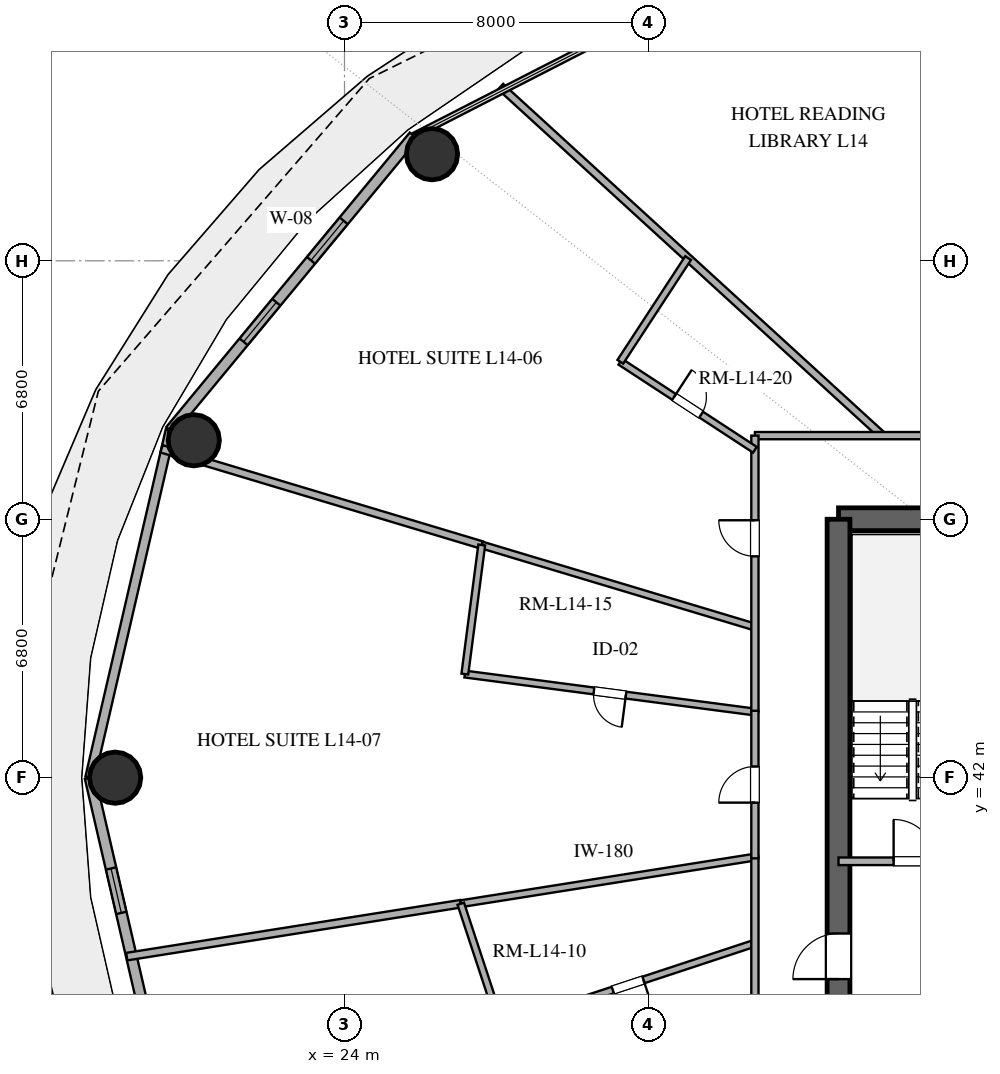
"""IFC4 building model, lengths in metres.
Left out: names, types, materials, properties, quantities, classifications, styles, units other than length and angle.
Written with IfcOpenShell. Run it as: python <this file> out.ifc"""

import sys

from ifc_helpers import new_model, si_unit, direction, frame, frame_2d, origin, origin_2d, place, context, subcontext, project, spatial, rectangle, hollow_circle, extrude, element, fill, save


model = new_model("IFC4")
c1 = context("Model", 3, precision=1e-05, world=origin(), true_north=direction((0.0, 1.0)))
c2 = subcontext(c1, "Body", "Model", "MODEL_VIEW")
j1 = project(units=[si_unit("LENGTHUNIT", "METRE"), si_unit("PLANEANGLEUNIT", "RADIAN")], contexts=[c1])
p1 = place(None, origin())
s1 = spatial("IfcSite", under=j1, at=p1, CompositionType="ELEMENT")
p2 = place(p1, origin())
s2 = spatial("IfcBuilding", under=s1, at=p2, CompositionType="ELEMENT")
p3 = place(p2, frame((0.0, 0.0, 60.6)))
s3 = spatial("IfcBuildingStorey", under=s2, at=p3, CompositionType="ELEMENT", Elevation=60.6)
p4 = place(p3, frame((37.0, 48.8, 0.0), z_axis=(0.0, 0.0, 1.0), x_axis=(1.0, 0.0, 0.0)))
e1 = element("IfcWall", 1, at=p4, inside=s3, PredefinedType="SHEAR", context=c2, shape_type="SweptSolid", body=[
    extrude(rectangle(XDim=4.0, YDim=0.6, at=frame_2d((2.0, 0.0))), origin(), (0.0, 0.0, 1.0), 3.38),
])
p5 = place(p3, frame((37.0, 35.2, 0.0), z_axis=(0.0, 0.0, 1.0), x_axis=(0.0, 1.0, 0.0)))
e2 = element("IfcWall", 2, at=p5, inside=s3, PredefinedType="SHEAR", context=c2, shape_type="SweptSolid", body=[
    extrude(rectangle(XDim=13.6, YDim=0.6, at=frame_2d((6.8, 0.0))), origin(), (0.0, 0.0, 1.0), 3.38),
])
p6 = place(p5, frame((1.5, 0.0, 0.0)))
e3 = element("IfcOpeningElement", 3, at=p6, cuts=e2, PredefinedType="OPENING", context=c2, shape_type="SweptSolid", body=[
    extrude(rectangle(XDim=1.2, YDim=2.15, at=frame_2d((0.6, 1.075))), frame((0.0, 0.31, 0.0), z_axis=(0.0, -1.0, 0.0), x_axis=(1.0, 0.0, 0.0)), (0.0, 0.0, 1.0), 0.62),
])
for number, where, z_axis, x_axis in (
    (4, (26.303, 58.405, 0.0), (0.0, 0.0, 1.0), (1.0, 0.0, 0.0)),
    (5, (20.034, 50.878, 0.0), (0.0, 0.0, 1.0), (1.0, 0.0, 0.0)),
    (6, (17.965, 42.0, 0.0), (0.0, 0.0, 1.0), (1.0, 0.0, 0.0)),
):
    element("IfcColumn", number, at=place(p3, frame(where, z_axis=z_axis, x_axis=x_axis)), inside=s3, PredefinedType="COLUMN", context=c2, shape_type="SweptSolid", body=[
        extrude(hollow_circle(Radius=0.675, WallThickness=0.036, at=origin_2d()), origin(), (0.0, 0.0, 1.0), 3.38),
    ])
p7 = place(p3, frame((25.826, 58.886, 0.0), z_axis=(0.0, 0.0, 1.0), x_axis=(-0.637296809613, -0.770618437657, 0.0)))
e7 = element("IfcWall", 7, at=p7, inside=s3, PredefinedType="SOLIDWALL", context=c2, shape_type="SweptSolid", body=[
    extrude(rectangle(XDim=10.053, YDim=0.28, at=frame_2d((5.027, 0.0))), origin(), (0.0, 0.0, 1.0), 3.38),
])
p8 = place(p7, frame((2.898, 0.0, 0.85)))
e8 = element("IfcOpeningElement", 8, at=p8, cuts=e7, PredefinedType="OPENING", context=c2, shape_type="SweptSolid", body=[
    extrude(rectangle(XDim=1.35, YDim=1.8, at=frame_2d((0.675, 0.9))), frame((0.0, 0.15, 0.0), z_axis=(0.0, -1.0, 0.0), x_axis=(1.0, 0.0, 0.0)), (0.0, 0.0, 1.0), 0.3),
])
p9 = place(p7, frame((5.68, 0.0, 0.85)))
e9 = element("IfcOpeningElement", 9, at=p9, cuts=e7, PredefinedType="OPENING", context=c2, shape_type="SweptSolid", body=[
    extrude(rectangle(XDim=1.35, YDim=1.8, at=frame_2d((0.675, 0.9))), frame((0.0, 0.15, 0.0), z_axis=(0.0, -1.0, 0.0), x_axis=(1.0, 0.0, 0.0)), (0.0, 0.0, 1.0), 0.3),
])
p10 = place(p3, frame((19.419, 51.138, 0.0), z_axis=(0.0, 0.0, 1.0), x_axis=(-0.225454452941, -0.974253709076, 0.0)))
e10 = element("IfcWall", 10, at=p10, inside=s3, PredefinedType="SOLIDWALL", context=c2, shape_type="SweptSolid", body=[
    extrude(rectangle(XDim=9.38, YDim=0.25, at=frame_2d((4.69, 0.0))), origin(), (0.0, 0.0, 1.0), 3.38),
])
p11 = place(p3, frame((17.304, 42.0, 0.0), z_axis=(0.0, 0.0, 1.0), x_axis=(0.225454452941, -0.974253709076, 0.0)))
e11 = element("IfcWall", 11, at=p11, inside=s3, PredefinedType="SOLIDWALL", context=c2, shape_type="SweptSolid", body=[
    extrude(rectangle(XDim=9.38, YDim=0.28, at=frame_2d((4.69, 0.0))), origin(), (0.0, 0.0, 1.0), 3.38),
])
p12 = place(p11, frame((2.452, 0.0, 0.85)))
e12 = element("IfcOpeningElement", 12, at=p12, cuts=e11, PredefinedType="OPENING", context=c2, shape_type="SweptSolid", body=[
    extrude(rectangle(XDim=1.2, YDim=1.6, at=frame_2d((0.6, 0.8))), frame((0.0, 0.15, 0.0), z_axis=(0.0, -1.0, 0.0), x_axis=(1.0, 0.0, 0.0)), (0.0, 0.0, 1.0), 0.3),
])
p13 = place(p11, frame((6.235, 0.0, 0.0)))
e13 = element("IfcOpeningElement", 13, at=p13, cuts=e11, PredefinedType="OPENING", context=c2, shape_type="SweptSolid", body=[
    extrude(rectangle(XDim=1.6, YDim=2.25, at=frame_2d((0.8, 1.125))), frame((0.0, 0.15, 0.0), z_axis=(0.0, -1.0, 0.0), x_axis=(1.0, 0.0, 0.0)), (0.0, 0.0, 1.0), 0.3),
])
p14 = place(p3, frame((37.0, 39.8, 0.0), z_axis=(0.0, 0.0, 1.0), x_axis=(1.0, 0.0, 0.0)))
e14 = element("IfcWall", 14, at=p14, inside=s3, PredefinedType="SOLIDWALL", context=c2, shape_type="SweptSolid", body=[
    extrude(rectangle(XDim=4.0, YDim=0.2, at=frame_2d((2.0, 0.0))), origin(), (0.0, 0.0, 1.0), 2.74),
])
p15 = place(p14, frame((1.45, 0.0, 0.0)))
e15 = element("IfcOpeningElement", 15, at=p15, cuts=e14, PredefinedType="OPENING", context=c2, shape_type="SweptSolid", body=[
    extrude(rectangle(XDim=1.1, YDim=2.15, at=frame_2d((0.55, 1.075))), frame((0.0, 0.11, 0.0), z_axis=(0.0, -1.0, 0.0), x_axis=(1.0, 0.0, 0.0)), (0.0, 0.0, 1.0), 0.22),
])
p16 = place(p3, frame((44.39, 51.0, 0.0), z_axis=(0.0, 0.0, 1.0), x_axis=(-0.372301847193, 0.928111703717, 0.0)))
e16 = element("IfcWall", 16, at=p16, inside=s3, PredefinedType="PARTITIONING", context=c2, shape_type="SweptSolid", body=[
    extrude(rectangle(XDim=14.688, YDim=0.2, at=frame_2d((7.344, 0.0))), origin(), (0.0, 0.0, 1.0), 2.74),
])
p17 = place(p3, frame((18.271, 37.292, 0.0), z_axis=(0.0, 0.0, 1.0), x_axis=(0.987691229297, 0.156416225401, 0.0)))
e17 = element("IfcWall", 17, at=p17, inside=s3, PredefinedType="PARTITIONING", context=c2, shape_type="SweptSolid", body=[
    extrude(rectangle(XDim=8.898, YDim=0.2, at=frame_2d((4.449, 0.0))), origin(), (0.0, 0.0, 1.0), 2.74),
])
p18 = place(p3, frame((19.184, 50.653, 0.0), z_axis=(0.0, 0.0, 1.0), x_axis=(0.957749889613, -0.287602414708, 0.0)))
e18 = element("IfcWall", 18, at=p18, inside=s3, PredefinedType="PARTITIONING", context=c2, shape_type="SweptSolid", body=[
    extrude(rectangle(XDim=8.8, YDim=0.2, at=frame_2d((4.4, 0.0))), origin(), (0.0, 0.0, 1.0), 2.74),
])
p19 = place(p3, frame((27.06, 38.683, 0.0), z_axis=(0.0, 0.0, 1.0), x_axis=(0.987690363599, 0.156421691762, 0.0)))
e19 = element("IfcWall", 19, at=p19, inside=s3, PredefinedType="PLUMBINGWALL", context=c2, shape_type="SweptSolid", body=[
    extrude(rectangle(XDim=7.837, YDim=0.18, at=frame_2d((3.918, 0.0))), origin(), (0.0, 0.0, 1.0), 2.74),
])
p20 = place(p3, frame((34.8, 43.728, 0.0), z_axis=(0.0, 0.0, 1.0), x_axis=(-0.991543548491, 0.129774386708, 0.0)))
e20 = element("IfcWall", 20, at=p20, inside=s3, PredefinedType="PLUMBINGWALL", context=c2, shape_type="SweptSolid", body=[
    extrude(rectangle(XDim=7.698, YDim=0.18, at=frame_2d((3.849, 0.0))), origin(), (0.0, 0.0, 1.0), 2.74),
])
p21 = place(p20, frame((3.424, 0.0, 0.0)))
e21 = element("IfcOpeningElement", 21, at=p21, cuts=e20, PredefinedType="OPENING", context=c2, shape_type="SweptSolid", body=[
    extrude(rectangle(XDim=0.85, YDim=2.1, at=frame_2d((0.425, 1.05))), frame((0.0, 0.1, 0.0), z_axis=(0.0, -1.0, 0.0), x_axis=(1.0, 0.0, 0.0)), (0.0, 0.0, 1.0), 0.2),
])
p22 = place(p3, frame((27.612, 48.122, 0.0), z_axis=(0.0, 0.0, 1.0), x_axis=(0.95775642604, -0.28758064674, 0.0)))
e22 = element("IfcWall", 22, at=p22, inside=s3, PredefinedType="PLUMBINGWALL", context=c2, shape_type="SweptSolid", body=[
    extrude(rectangle(XDim=7.506, YDim=0.18, at=frame_2d((3.753, 0.0))), origin(), (0.0, 0.0, 1.0), 2.74),
])
p23 = place(p3, frame((34.8, 37.646, 0.0), z_axis=(0.0, 0.0, 1.0), x_axis=(-0.949662150081, -0.313275917849, 0.0)))
e23 = element("IfcWall", 23, at=p23, inside=s3, PredefinedType="PLUMBINGWALL", context=c2, shape_type="SweptSolid", body=[
    extrude(rectangle(XDim=7.026, YDim=0.18, at=frame_2d((3.513, 0.0))), origin(), (0.0, 0.0, 1.0), 2.74),
])
p24 = place(p23, frame((3.088, 0.0, 0.0)))
e24 = element("IfcOpeningElement", 24, at=p24, cuts=e23, PredefinedType="OPENING", context=c2, shape_type="SweptSolid", body=[
    extrude(rectangle(XDim=0.85, YDim=2.1, at=frame_2d((0.425, 1.05))), frame((0.0, 0.1, 0.0), z_axis=(0.0, -1.0, 0.0), x_axis=(1.0, 0.0, 0.0)), (0.0, 0.0, 1.0), 0.2),
])
p25 = place(p3, frame((38.154, 51.0, 0.0), z_axis=(0.0, 0.0, 1.0), x_axis=(-0.738119160364, 0.674670367738, 0.0)))
e25 = element("IfcWall", 25, at=p25, inside=s3, PredefinedType="PARTITIONING", context=c2, shape_type="SweptSolid", body=[
    extrude(rectangle(XDim=13.61, YDim=0.2, at=frame_2d((6.805, 0.0))), origin(), (0.0, 0.0, 1.0), 2.74),
])
p26 = place(p3, frame((34.8, 51.0, 0.0), z_axis=(0.0, 0.0, 1.0), x_axis=(1.0, 0.0, 0.0)))
e26 = element("IfcWall", 26, at=p26, inside=s3, PredefinedType="PARTITIONING", context=c2, shape_type="SweptSolid", body=[
    extrude(rectangle(XDim=13.839, YDim=0.19, at=frame_2d((6.919, 0.0))), origin(), (0.0, 0.0, 1.0), 2.74),
])
p27 = place(p26, frame((5.965, 0.0, 0.0)))
e27 = element("IfcOpeningElement", 27, at=p27, cuts=e26, PredefinedType="OPENING", context=c2, shape_type="SweptSolid", body=[
    extrude(rectangle(XDim=1.0, YDim=2.2, at=frame_2d((0.5, 1.1))), frame((0.0, 0.105, 0.0), z_axis=(0.0, -1.0, 0.0), x_axis=(1.0, 0.0, 0.0)), (0.0, 0.0, 1.0), 0.21),
])
p28 = place(p26, frame((10.493, 0.0, 0.0)))
e28 = element("IfcOpeningElement", 28, at=p28, cuts=e26, PredefinedType="OPENING", context=c2, shape_type="SweptSolid", body=[
    extrude(rectangle(XDim=0.95, YDim=2.15, at=frame_2d((0.475, 1.075))), frame((0.0, 0.105, 0.0), z_axis=(0.0, -1.0, 0.0), x_axis=(1.0, 0.0, 0.0)), (0.0, 0.0, 1.0), 0.21),
])
p29 = place(p3, frame((34.8, 43.728, 0.0), z_axis=(0.0, 0.0, 1.0), x_axis=(0.0, 1.0, 0.0)))
e29 = element("IfcWall", 29, at=p29, inside=s3, PredefinedType="PARTITIONING", context=c2, shape_type="SweptSolid", body=[
    extrude(rectangle(XDim=7.272, YDim=0.19, at=frame_2d((3.636, 0.0))), origin(), (0.0, 0.0, 1.0), 2.74),
])
p30 = place(p29, frame((4.096, 0.0, 0.0)))
e30 = element("IfcOpeningElement", 30, at=p30, cuts=e29, PredefinedType="OPENING", context=c2, shape_type="SweptSolid", body=[
    extrude(rectangle(XDim=0.95, YDim=2.15, at=frame_2d((0.475, 1.075))), frame((0.0, 0.105, 0.0), z_axis=(0.0, -1.0, 0.0), x_axis=(1.0, 0.0, 0.0)), (0.0, 0.0, 1.0), 0.21),
])
p31 = place(p3, frame((34.8, 33.0, 0.0), z_axis=(0.0, 0.0, 1.0), x_axis=(0.0, 1.0, 0.0)))
e31 = element("IfcWall", 31, at=p31, inside=s3, PredefinedType="PARTITIONING", context=c2, shape_type="SweptSolid", body=[
    extrude(rectangle(XDim=6.942, YDim=0.19, at=frame_2d((3.471, 0.0))), origin(), (0.0, 0.0, 1.0), 2.74),
])
p32 = place(p31, frame((1.865, 0.0, 0.0)))
e32 = element("IfcOpeningElement", 32, at=p32, cuts=e31, PredefinedType="OPENING", context=c2, shape_type="SweptSolid", body=[
    extrude(rectangle(XDim=0.95, YDim=2.15, at=frame_2d((0.475, 1.075))), frame((0.0, 0.105, 0.0), z_axis=(0.0, -1.0, 0.0), x_axis=(1.0, 0.0, 0.0)), (0.0, 0.0, 1.0), 0.21),
])
p33 = place(p3, frame((31.258, 52.944, 0.0), z_axis=(0.0, 0.0, 1.0), x_axis=(0.837031612028, -0.5471545307, 0.0)))
e33 = element("IfcWall", 33, at=p33, inside=s3, PredefinedType="PLUMBINGWALL", context=c2, shape_type="SweptSolid", body=[
    extrude(rectangle(XDim=4.231, YDim=0.18, at=frame_2d((2.116, 0.0))), origin(), (0.0, 0.0, 1.0), 2.74),
])
p34 = place(p33, frame((1.691, 0.0, 0.0)))
e34 = element("IfcOpeningElement", 34, at=p34, cuts=e33, PredefinedType="OPENING", context=c2, shape_type="SweptSolid", body=[
    extrude(rectangle(XDim=0.85, YDim=2.1, at=frame_2d((0.425, 1.05))), frame((0.0, 0.1, 0.0), z_axis=(0.0, -1.0, 0.0), x_axis=(1.0, 0.0, 0.0)), (0.0, 0.0, 1.0), 0.2),
])
p35 = place(p3, frame((34.8, 39.877, 0.0), z_axis=(0.0, 0.0, 1.0), x_axis=(0.0, 1.0, 0.0)))
e35 = element("IfcWall", 35, at=p35, inside=s3, PredefinedType="PARTITIONING", context=c2, shape_type="SweptSolid", body=[
    extrude(rectangle(XDim=3.883, YDim=0.19, at=frame_2d((1.941, 0.0))), origin(), (0.0, 0.0, 1.0), 2.74),
])
p36 = place(p35, frame((1.467, 0.0, 0.0)))
e36 = element("IfcOpeningElement", 36, at=p36, cuts=e35, PredefinedType="OPENING", context=c2, shape_type="SweptSolid", body=[
    extrude(rectangle(XDim=0.95, YDim=2.15, at=frame_2d((0.475, 1.075))), frame((0.0, 0.105, 0.0), z_axis=(0.0, -1.0, 0.0), x_axis=(1.0, 0.0, 0.0)), (0.0, 0.0, 1.0), 0.21),
])
p37 = place(p3, frame((27.167, 44.727, 0.0), z_axis=(0.0, 0.0, 1.0), x_axis=(0.129823772588, 0.991537083558, 0.0)))
e37 = element("IfcWall", 37, at=p37, inside=s3, PredefinedType="PLUMBINGWALL", context=c2, shape_type="SweptSolid", body=[
    extrude(rectangle(XDim=3.425, YDim=0.18, at=frame_2d((1.712, 0.0))), origin(), (0.0, 0.0, 1.0), 2.74),
])
p38 = place(p3, frame((28.128, 35.445, 0.0), z_axis=(0.0, 0.0, 1.0), x_axis=(-0.313262541659, 0.949666562533, 0.0)))
e38 = element("IfcWall", 38, at=p38, inside=s3, PredefinedType="PLUMBINGWALL", context=c2, shape_type="SweptSolid", body=[
    extrude(rectangle(XDim=3.41, YDim=0.18, at=frame_2d((1.705, 0.0))), origin(), (0.0, 0.0, 1.0), 2.74),
])
p39 = place(p3, frame((33.042, 55.672, 0.0), z_axis=(0.0, 0.0, 1.0), x_axis=(-0.547176717469, -0.837017108463, 0.0)))
e39 = element("IfcWall", 39, at=p39, inside=s3, PredefinedType="PLUMBINGWALL", context=c2, shape_type="SweptSolid", body=[
    extrude(rectangle(XDim=3.26, YDim=0.18, at=frame_2d((1.63, 0.0))), origin(), (0.0, 0.0, 1.0), 2.74),
])
p40 = place(p8, origin())
e40 = element("IfcWindow", 40, at=p40, inside=s3, PartitioningType="SINGLE_PANEL", PredefinedType="WINDOW", context=c2, shape_type="SweptSolid", body=[
    extrude(rectangle(XDim=1.35, YDim=1.8, at=frame_2d((0.675, 0.9))), frame((0.0, 0.03, 0.0), z_axis=(0.0, -1.0, 0.0), x_axis=(1.0, 0.0, 0.0)), (0.0, 0.0, 1.0), 0.06),
])
fill(e8, e40)
p41 = place(p9, origin())
e41 = element("IfcWindow", 41, at=p41, inside=s3, PartitioningType="SINGLE_PANEL", PredefinedType="WINDOW", context=c2, shape_type="SweptSolid", body=[
    extrude(rectangle(XDim=1.35, YDim=1.8, at=frame_2d((0.675, 0.9))), frame((0.0, 0.03, 0.0), z_axis=(0.0, -1.0, 0.0), x_axis=(1.0, 0.0, 0.0)), (0.0, 0.0, 1.0), 0.06),
])
fill(e9, e41)
p42 = place(p12, origin())
e42 = element("IfcWindow", 42, at=p42, inside=s3, PartitioningType="SINGLE_PANEL", PredefinedType="WINDOW", context=c2, shape_type="SweptSolid", body=[
    extrude(rectangle(XDim=1.2, YDim=1.6, at=frame_2d((0.6, 0.8))), frame((0.0, 0.03, 0.0), z_axis=(0.0, -1.0, 0.0), x_axis=(1.0, 0.0, 0.0)), (0.0, 0.0, 1.0), 0.06),
])
fill(e12, e42)
p43 = place(p6, origin())
e43 = element("IfcDoor", 43, at=p43, inside=s3, OperationType="SINGLE_SWING_LEFT", PredefinedType="DOOR", context=c2, shape_type="SweptSolid", body=[
    extrude(rectangle(XDim=1.2, YDim=2.15, at=frame_2d((0.6, 1.075))), frame((0.0, 0.025, 0.0), z_axis=(0.0, -1.0, 0.0), x_axis=(1.0, 0.0, 0.0)), (0.0, 0.0, 1.0), 0.05),
])
fill(e3, e43)
p44 = place(p15, origin())
e44 = element("IfcDoor", 44, at=p44, inside=s3, OperationType="SINGLE_SWING_LEFT", PredefinedType="DOOR", context=c2, shape_type="SweptSolid", body=[
    extrude(rectangle(XDim=1.1, YDim=2.15, at=frame_2d((0.55, 1.075))), frame((0.0, 0.025, 0.0), z_axis=(0.0, -1.0, 0.0), x_axis=(1.0, 0.0, 0.0)), (0.0, 0.0, 1.0), 0.05),
])
fill(e15, e44)
p45 = place(p21, origin())
e45 = element("IfcDoor", 45, at=p45, inside=s3, OperationType="SINGLE_SWING_LEFT", PredefinedType="DOOR", context=c2, shape_type="SweptSolid", body=[
    extrude(rectangle(XDim=0.85, YDim=2.1, at=frame_2d((0.425, 1.05))), frame((0.0, 0.025, 0.0), z_axis=(0.0, -1.0, 0.0), x_axis=(1.0, 0.0, 0.0)), (0.0, 0.0, 1.0), 0.05),
])
fill(e21, e45)
p46 = place(p24, origin())
e46 = element("IfcDoor", 46, at=p46, inside=s3, OperationType="SINGLE_SWING_LEFT", PredefinedType="DOOR", context=c2, shape_type="SweptSolid", body=[
    extrude(rectangle(XDim=0.85, YDim=2.1, at=frame_2d((0.425, 1.05))), frame((0.0, 0.025, 0.0), z_axis=(0.0, -1.0, 0.0), x_axis=(1.0, 0.0, 0.0)), (0.0, 0.0, 1.0), 0.05),
])
fill(e24, e46)
p47 = place(p30, origin())
e47 = element("IfcDoor", 47, at=p47, inside=s3, OperationType="SINGLE_SWING_RIGHT", PredefinedType="DOOR", context=c2, shape_type="SweptSolid", body=[
    extrude(rectangle(XDim=0.95, YDim=2.15, at=frame_2d((0.475, 1.075))), frame((0.0, 0.025, 0.0), z_axis=(0.0, -1.0, 0.0), x_axis=(1.0, 0.0, 0.0)), (0.0, 0.0, 1.0), 0.05),
])
fill(e30, e47)
p48 = place(p34, origin())
e48 = element("IfcDoor", 48, at=p48, inside=s3, OperationType="SINGLE_SWING_LEFT", PredefinedType="DOOR", context=c2, shape_type="SweptSolid", body=[
    extrude(rectangle(XDim=0.85, YDim=2.1, at=frame_2d((0.425, 1.05))), frame((0.0, 0.025, 0.0), z_axis=(0.0, -1.0, 0.0), x_axis=(1.0, 0.0, 0.0)), (0.0, 0.0, 1.0), 0.05),
])
fill(e34, e48)
p49 = place(p36, origin())
e49 = element("IfcDoor", 49, at=p49, inside=s3, OperationType="SINGLE_SWING_LEFT", PredefinedType="DOOR", context=c2, shape_type="SweptSolid", body=[
    extrude(rectangle(XDim=0.95, YDim=2.15, at=frame_2d((0.475, 1.075))), frame((0.0, 0.025, 0.0), z_axis=(0.0, -1.0, 0.0), x_axis=(1.0, 0.0, 0.0)), (0.0, 0.0, 1.0), 0.05),
])
fill(e36, e49)
save(model, sys.argv[1])
